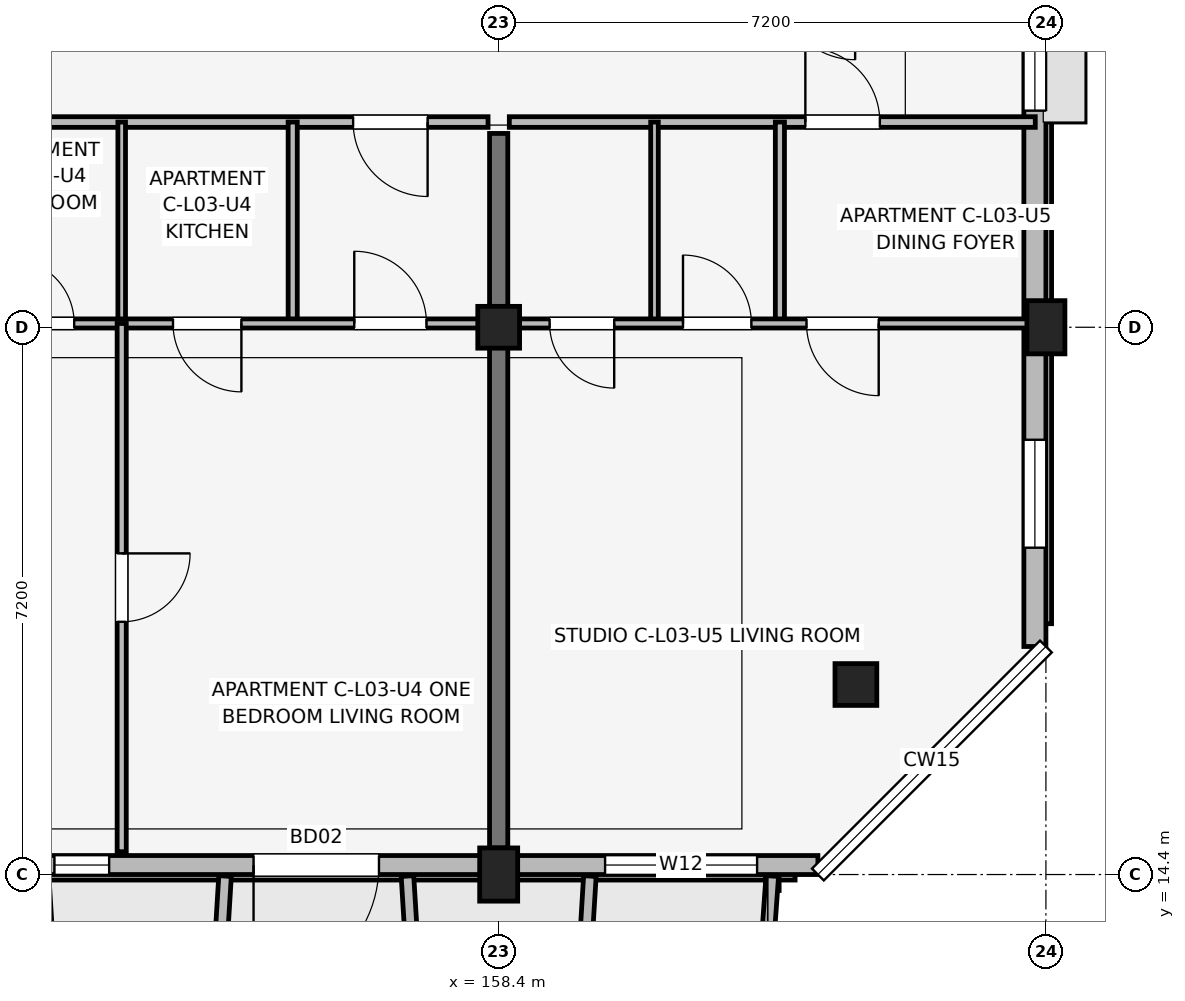
"""IFC4 building model, lengths in metres.
Left out: names, types, materials, properties, quantities, classifications, styles, units other than length and angle.
Written with IfcOpenShell. Run it as: python <this file> out.ifc"""

import sys

from ifc_helpers import new_model, si_unit, direction, frame, frame_2d, origin, origin_2d, place, context, subcontext, project, spatial, rectangle, extrude, element, fill, save


model = new_model("IFC4")
c1 = context("Model", 3, precision=1e-05, world=origin(), true_north=direction((0.0, 1.0)))
c2 = subcontext(c1, "Body", "Model", "MODEL_VIEW")
j1 = project(units=[si_unit("LENGTHUNIT", "METRE"), si_unit("PLANEANGLEUNIT", "RADIAN")], contexts=[c1])
p1 = place(None, origin())
s1 = spatial("IfcSite", under=j1, at=p1, CompositionType="ELEMENT")
p2 = place(p1, origin())
s2 = spatial("IfcBuilding", under=s1, at=p2, CompositionType="ELEMENT")
p3 = place(p2, frame((0.0, 0.0, 11.85)))
s3 = spatial("IfcBuildingStorey", under=s2, at=p3, CompositionType="ELEMENT", Elevation=11.85)
p4 = place(p3, frame((158.4, 14.4, 0.0), z_axis=(0.0, 0.0, 1.0), x_axis=(1.0, 0.0, 0.0)))
e1 = element("IfcColumn", 1, at=p4, inside=s3, PredefinedType="COLUMN", context=c2, shape_type="SweptSolid", body=[
    extrude(rectangle(XDim=0.5, YDim=0.7, at=origin_2d()), origin(), (0.0, 0.0, 1.0), 3.15),
])
for number, where, z_axis, x_axis in (
    (2, (158.4, 21.6, 0.0), (0.0, 0.0, 1.0), (1.0, 0.0, 0.0)),
    (3, (163.1, 16.9, 0.0), (0.0, 0.0, 1.0), (1.0, 0.0, 0.0)),
):
    element("IfcColumn", number, at=place(p3, frame(where, z_axis=z_axis, x_axis=x_axis)), inside=s3, PredefinedType="COLUMN", context=c2, shape_type="SweptSolid", body=[
        extrude(rectangle(XDim=0.55, YDim=0.55, at=origin_2d()), origin(), (0.0, 0.0, 1.0), 3.15),
    ])
p5 = place(p3, frame((165.6, 21.6, 0.0), z_axis=(0.0, 0.0, 1.0), x_axis=(1.0, 0.0, 0.0)))
e4 = element("IfcColumn", 4, at=p5, inside=s3, PredefinedType="COLUMN", context=c2, shape_type="SweptSolid", body=[
    extrude(rectangle(XDim=0.5, YDim=0.7, at=origin_2d()), origin(), (0.0, 0.0, 1.0), 3.15),
])
p6 = place(p3, frame((158.4, 14.75, 0.0), z_axis=(0.0, 0.0, 1.0), x_axis=(0.0, 1.0, 0.0)))
e5 = element("IfcWall", 5, at=p6, inside=s3, PredefinedType="SHEAR", context=c2, shape_type="SweptSolid", body=[
    extrude(rectangle(XDim=9.4, YDim=0.24, at=frame_2d((4.7, 0.0))), origin(), (0.0, 0.0, 1.0), 3.15),
])
p7 = place(p3, frame((132.6, 14.525, 0.0), z_axis=(0.0, 0.0, 1.0), x_axis=(1.0, 0.0, 0.0)))
e6 = element("IfcWall", 6, at=p7, inside=s3, PredefinedType="SOLIDWALL", context=c2, shape_type="SweptSolid", body=[
    extrude(rectangle(XDim=30.0, YDim=0.25, at=frame_2d((15.0, 0.0))), origin(), (0.0, 0.0, 1.0), 2.43),
])
p8 = place(p7, frame((9.9, 0.0, 0.0), z_axis=(0.0, 0.0, 1.0), x_axis=(-1.0, 0.0, 0.0)))
e7 = element("IfcOpeningElement", 7, at=p8, cuts=e6, PredefinedType="OPENING", context=c2, shape_type="SweptSolid", body=[
    extrude(rectangle(XDim=1.8, YDim=2.15, at=frame_2d((0.9, 1.075))), frame((0.0, 0.135, 0.0), z_axis=(0.0, -1.0, 0.0), x_axis=(1.0, 0.0, 0.0)), (0.0, 0.0, 1.0), 0.27),
])
p9 = place(p7, frame((24.225, 0.0, 0.0), z_axis=(0.0, 0.0, 1.0), x_axis=(-1.0, 0.0, 0.0)))
e8 = element("IfcOpeningElement", 8, at=p9, cuts=e6, PredefinedType="OPENING", context=c2, shape_type="SweptSolid", body=[
    extrude(rectangle(XDim=1.65, YDim=2.15, at=frame_2d((0.825, 1.075))), frame((0.0, 0.135, 0.0), z_axis=(0.0, -1.0, 0.0), x_axis=(1.0, 0.0, 0.0)), (0.0, 0.0, 1.0), 0.27),
])
p10 = place(p7, frame((1.215, 0.0, 0.75)))
e9 = element("IfcOpeningElement", 9, at=p10, cuts=e6, PredefinedType="OPENING", context=c2, shape_type="SweptSolid", body=[
    extrude(rectangle(XDim=1.34, YDim=1.55, at=frame_2d((0.67, 0.775))), frame((0.0, 0.135, 0.0), z_axis=(0.0, -1.0, 0.0), x_axis=(1.0, 0.0, 0.0)), (0.0, 0.0, 1.0), 0.27),
])
p11 = place(p7, frame((5.555, 0.0, 0.75)))
e10 = element("IfcOpeningElement", 10, at=p11, cuts=e6, PredefinedType="OPENING", context=c2, shape_type="SweptSolid", body=[
    extrude(rectangle(XDim=0.72, YDim=1.35, at=frame_2d((0.36, 0.675))), frame((0.0, 0.135, 0.0), z_axis=(0.0, -1.0, 0.0), x_axis=(1.0, 0.0, 0.0)), (0.0, 0.0, 1.0), 0.27),
])
p12 = place(p7, frame((12.94, 0.0, 0.7)))
e11 = element("IfcOpeningElement", 11, at=p12, cuts=e6, PredefinedType="OPENING", context=c2, shape_type="SweptSolid", body=[
    extrude(rectangle(XDim=1.72, YDim=1.6, at=frame_2d((0.86, 0.8))), frame((0.0, 0.135, 0.0), z_axis=(0.0, -1.0, 0.0), x_axis=(1.0, 0.0, 0.0)), (0.0, 0.0, 1.0), 0.27),
])
p13 = place(p7, frame((19.955, 0.0, 0.75)))
e12 = element("IfcOpeningElement", 12, at=p13, cuts=e6, PredefinedType="OPENING", context=c2, shape_type="SweptSolid", body=[
    extrude(rectangle(XDim=0.72, YDim=1.35, at=frame_2d((0.36, 0.675))), frame((0.0, 0.135, 0.0), z_axis=(0.0, -1.0, 0.0), x_axis=(1.0, 0.0, 0.0)), (0.0, 0.0, 1.0), 0.27),
])
p14 = place(p7, frame((27.2, 0.0, 0.67)))
e13 = element("IfcOpeningElement", 13, at=p14, cuts=e6, PredefinedType="OPENING", context=c2, shape_type="SweptSolid", body=[
    extrude(rectangle(XDim=2.0, YDim=1.65, at=frame_2d((1.0, 0.825))), frame((0.0, 0.135, 0.0), z_axis=(0.0, -1.0, 0.0), x_axis=(1.0, 0.0, 0.0)), (0.0, 0.0, 1.0), 0.27),
])
p15 = place(p3, frame((165.455, 17.4, 0.0), z_axis=(0.0, 0.0, 1.0), x_axis=(0.0, 1.0, 0.0)))
e14 = element("IfcWall", 14, at=p15, inside=s3, PredefinedType="SOLIDWALL", context=c2, shape_type="SweptSolid", body=[
    extrude(rectangle(XDim=15.6, YDim=0.29, at=frame_2d((7.8, 0.0))), origin(), (0.0, 0.0, 1.0), 2.38),
])
p16 = place(p15, frame((7.05, 0.0, 1.05)))
e15 = element("IfcOpeningElement", 15, at=p16, cuts=e14, PredefinedType="OPENING", context=c2, shape_type="SweptSolid", body=[
    extrude(rectangle(XDim=1.5, YDim=1.15, at=frame_2d((0.75, 0.575))), frame((0.0, 0.155, 0.0), z_axis=(0.0, -1.0, 0.0), x_axis=(1.0, 0.0, 0.0)), (0.0, 0.0, 1.0), 0.31),
])
p17 = place(p15, frame((1.3, 0.0, 0.67)))
e16 = element("IfcOpeningElement", 16, at=p17, cuts=e14, PredefinedType="OPENING", context=c2, shape_type="SweptSolid", body=[
    extrude(rectangle(XDim=1.42, YDim=1.6, at=frame_2d((0.71, 0.8))), frame((0.0, 0.155, 0.0), z_axis=(0.0, -1.0, 0.0), x_axis=(1.0, 0.0, 0.0)), (0.0, 0.0, 1.0), 0.31),
])
for number, where, z_axis, x_axis in (
    (17, (152.4, 14.38, 0.0), (0.0, 0.0, 1.0), (0.061, -0.998, 0.0)),
    (18, (154.8, 14.38, 0.0), (0.0, 0.0, 1.0), (-0.061, -0.998, 0.0)),
    (19, (157.2, 14.38, 0.0), (0.0, 0.0, 1.0), (0.061, -0.998, 0.0)),
):
    element("IfcWall", number, at=place(p3, frame(where, z_axis=z_axis, x_axis=x_axis)), inside=s3, PredefinedType="ELEMENTEDWALL", context=c2, shape_type="SweptSolid", body=[
        extrude(rectangle(XDim=1.964, YDim=0.165, at=frame_2d((0.982, 0.0))), origin(), (0.0, 0.0, 1.0), 2.58),
    ])
p18 = place(p3, frame((159.6, 14.38, 0.0), z_axis=(0.0, 0.0, 1.0), x_axis=(-0.061170732449, -0.998127317276, 0.0)))
e20 = element("IfcWall", 20, at=p18, inside=s3, PredefinedType="ELEMENTEDWALL", context=c2, shape_type="SweptSolid", body=[
    extrude(rectangle(XDim=1.964, YDim=0.165, at=frame_2d((0.982, 0.0))), origin(), (0.0, 0.0, 1.0), 2.95),
])
p19 = place(p3, frame((162.0, 14.38, 0.0), z_axis=(0.0, 0.0, 1.0), x_axis=(-0.071194071069, -0.997462482625, 0.0)))
e21 = element("IfcWall", 21, at=p19, inside=s3, PredefinedType="ELEMENTEDWALL", context=c2, shape_type="SweptSolid", body=[
    extrude(rectangle(XDim=1.965, YDim=0.165, at=frame_2d((0.982, 0.0))), origin(), (0.0, 0.0, 1.0), 2.95),
])
p20 = place(p3, frame((151.34, 24.3, 0.0), z_axis=(0.0, 0.0, 1.0), x_axis=(1.0, 0.0, 0.0)))
e22 = element("IfcWall", 22, at=p20, inside=s3, PredefinedType="PARTITIONING", context=c2, shape_type="SweptSolid", body=[
    extrude(rectangle(XDim=6.92, YDim=0.14, at=frame_2d((3.46, 0.0))), origin(), (0.0, 0.0, 1.0), 2.38),
])
p21 = place(p20, frame((6.125, 0.0, 0.0), z_axis=(0.0, 0.0, 1.0), x_axis=(-1.0, 0.0, 0.0)))
e23 = element("IfcOpeningElement", 23, at=p21, cuts=e22, PredefinedType="OPENING", context=c2, shape_type="SweptSolid", body=[
    extrude(rectangle(XDim=0.98, YDim=2.1, at=frame_2d((0.49, 1.05))), frame((0.0, 0.08, 0.0), z_axis=(0.0, -1.0, 0.0), x_axis=(1.0, 0.0, 0.0)), (0.0, 0.0, 1.0), 0.16),
])
p22 = place(p3, frame((153.44, 21.65, 0.0), z_axis=(0.0, 0.0, 1.0), x_axis=(0.0, 1.0, 0.0)))
e24 = element("IfcWall", 24, at=p22, inside=s3, PredefinedType="PARTITIONING", context=c2, shape_type="SweptSolid", body=[
    extrude(rectangle(XDim=2.65, YDim=0.1, at=frame_2d((1.325, 0.0))), origin(), (0.0, 0.0, 1.0), 2.375),
])
p23 = place(p3, frame((155.69, 21.65, 0.0), z_axis=(0.0, 0.0, 1.0), x_axis=(0.0, 1.0, 0.0)))
e25 = element("IfcWall", 25, at=p23, inside=s3, PredefinedType="PARTITIONING", context=c2, shape_type="SweptSolid", body=[
    extrude(rectangle(XDim=2.65, YDim=0.12, at=frame_2d((1.325, 0.0))), origin(), (0.0, 0.0, 1.0), 2.375),
])
p24 = place(p3, frame((151.34, 21.65, 0.0), z_axis=(0.0, 0.0, 1.0), x_axis=(1.0, 0.0, 0.0)))
e26 = element("IfcWall", 26, at=p24, inside=s3, PredefinedType="PARTITIONING", context=c2, shape_type="SweptSolid", body=[
    extrude(rectangle(XDim=6.92, YDim=0.12, at=frame_2d((3.46, 0.0))), origin(), (0.0, 0.0, 1.0), 2.375),
])
p25 = place(p24, frame((0.625, 0.0, 0.0)))
e27 = element("IfcOpeningElement", 27, at=p25, cuts=e26, PredefinedType="OPENING", context=c2, shape_type="SweptSolid", body=[
    extrude(rectangle(XDim=0.85, YDim=2.08, at=frame_2d((0.425, 1.04))), frame((0.0, 0.07, 0.0), z_axis=(0.0, -1.0, 0.0), x_axis=(1.0, 0.0, 0.0)), (0.0, 0.0, 1.0), 0.14),
])
p26 = place(p24, frame((3.675, 0.0, 0.0), z_axis=(0.0, 0.0, 1.0), x_axis=(-1.0, 0.0, 0.0)))
e28 = element("IfcOpeningElement", 28, at=p26, cuts=e26, PredefinedType="OPENING", context=c2, shape_type="SweptSolid", body=[
    extrude(rectangle(XDim=0.9, YDim=2.08, at=frame_2d((0.45, 1.04))), frame((0.0, 0.07, 0.0), z_axis=(0.0, -1.0, 0.0), x_axis=(1.0, 0.0, 0.0)), (0.0, 0.0, 1.0), 0.14),
])
p27 = place(p24, frame((5.16, 0.0, 0.0)))
e29 = element("IfcOpeningElement", 29, at=p27, cuts=e26, PredefinedType="OPENING", context=c2, shape_type="SweptSolid", body=[
    extrude(rectangle(XDim=0.95, YDim=2.08, at=frame_2d((0.475, 1.04))), frame((0.0, 0.07, 0.0), z_axis=(0.0, -1.0, 0.0), x_axis=(1.0, 0.0, 0.0)), (0.0, 0.0, 1.0), 0.14),
])
p28 = place(p3, frame((153.44, 14.7, 0.0), z_axis=(0.0, 0.0, 1.0), x_axis=(0.0, 1.0, 0.0)))
e30 = element("IfcWall", 30, at=p28, inside=s3, PredefinedType="PARTITIONING", context=c2, shape_type="SweptSolid", body=[
    extrude(rectangle(XDim=6.95, YDim=0.12, at=frame_2d((3.475, 0.0))), origin(), (0.0, 0.0, 1.0), 2.375),
])
p29 = place(p28, frame((3.925, 0.0, 0.0), z_axis=(0.0, 0.0, 1.0), x_axis=(-1.0, 0.0, 0.0)))
e31 = element("IfcOpeningElement", 31, at=p29, cuts=e30, PredefinedType="OPENING", context=c2, shape_type="SweptSolid", body=[
    extrude(rectangle(XDim=0.9, YDim=2.08, at=frame_2d((0.45, 1.04))), frame((0.0, 0.07, 0.0), z_axis=(0.0, -1.0, 0.0), x_axis=(1.0, 0.0, 0.0)), (0.0, 0.0, 1.0), 0.14),
])
p30 = place(p3, frame((158.54, 24.3, 0.0), z_axis=(0.0, 0.0, 1.0), x_axis=(1.0, 0.0, 0.0)))
e32 = element("IfcWall", 32, at=p30, inside=s3, PredefinedType="PARTITIONING", context=c2, shape_type="SweptSolid", body=[
    extrude(rectangle(XDim=6.92, YDim=0.14, at=frame_2d((3.46, 0.0))), origin(), (0.0, 0.0, 1.0), 2.38),
])
p31 = place(p30, frame((3.895, 0.0, 0.0)))
e33 = element("IfcOpeningElement", 33, at=p31, cuts=e32, PredefinedType="OPENING", context=c2, shape_type="SweptSolid", body=[
    extrude(rectangle(XDim=0.98, YDim=2.1, at=frame_2d((0.49, 1.05))), frame((0.0, 0.08, 0.0), z_axis=(0.0, -1.0, 0.0), x_axis=(1.0, 0.0, 0.0)), (0.0, 0.0, 1.0), 0.16),
])
p32 = place(p3, frame((160.45, 21.65, 0.0), z_axis=(0.0, 0.0, 1.0), x_axis=(0.0, 1.0, 0.0)))
e34 = element("IfcWall", 34, at=p32, inside=s3, PredefinedType="PARTITIONING", context=c2, shape_type="SweptSolid", body=[
    extrude(rectangle(XDim=2.65, YDim=0.1, at=frame_2d((1.325, 0.0))), origin(), (0.0, 0.0, 1.0), 2.375),
])
p33 = place(p3, frame((162.1, 21.65, 0.0), z_axis=(0.0, 0.0, 1.0), x_axis=(0.0, 1.0, 0.0)))
e35 = element("IfcWall", 35, at=p33, inside=s3, PredefinedType="PARTITIONING", context=c2, shape_type="SweptSolid", body=[
    extrude(rectangle(XDim=2.65, YDim=0.12, at=frame_2d((1.325, 0.0))), origin(), (0.0, 0.0, 1.0), 2.375),
])
p34 = place(p3, frame((158.54, 21.65, 0.0), z_axis=(0.0, 0.0, 1.0), x_axis=(1.0, 0.0, 0.0)))
e36 = element("IfcWall", 36, at=p34, inside=s3, PredefinedType="PARTITIONING", context=c2, shape_type="SweptSolid", body=[
    extrude(rectangle(XDim=6.92, YDim=0.12, at=frame_2d((3.46, 0.0))), origin(), (0.0, 0.0, 1.0), 2.375),
])
p35 = place(p34, frame((1.38, 0.0, 0.0), z_axis=(0.0, 0.0, 1.0), x_axis=(-1.0, 0.0, 0.0)))
e37 = element("IfcOpeningElement", 37, at=p35, cuts=e36, PredefinedType="OPENING", context=c2, shape_type="SweptSolid", body=[
    extrude(rectangle(XDim=0.85, YDim=2.08, at=frame_2d((0.425, 1.04))), frame((0.0, 0.07, 0.0), z_axis=(0.0, -1.0, 0.0), x_axis=(1.0, 0.0, 0.0)), (0.0, 0.0, 1.0), 0.14),
])
p36 = place(p34, frame((2.285, 0.0, 0.0)))
e38 = element("IfcOpeningElement", 38, at=p36, cuts=e36, PredefinedType="OPENING", context=c2, shape_type="SweptSolid", body=[
    extrude(rectangle(XDim=0.9, YDim=2.08, at=frame_2d((0.45, 1.04))), frame((0.0, 0.07, 0.0), z_axis=(0.0, -1.0, 0.0), x_axis=(1.0, 0.0, 0.0)), (0.0, 0.0, 1.0), 0.14),
])
p37 = place(p34, frame((4.86, 0.0, 0.0), z_axis=(0.0, 0.0, 1.0), x_axis=(-1.0, 0.0, 0.0)))
e39 = element("IfcOpeningElement", 39, at=p37, cuts=e36, PredefinedType="OPENING", context=c2, shape_type="SweptSolid", body=[
    extrude(rectangle(XDim=0.95, YDim=2.08, at=frame_2d((0.475, 1.04))), frame((0.0, 0.07, 0.0), z_axis=(0.0, -1.0, 0.0), x_axis=(1.0, 0.0, 0.0)), (0.0, 0.0, 1.0), 0.14),
])
p38 = place(p9, origin())
e40 = element("IfcDoor", 40, at=p38, inside=s3, OperationType="SINGLE_SWING_LEFT", PredefinedType="DOOR", context=c2, shape_type="SweptSolid", body=[
    extrude(rectangle(XDim=1.65, YDim=2.15, at=frame_2d((0.825, 1.075))), frame((0.0, 0.025, 0.0), z_axis=(0.0, -1.0, 0.0), x_axis=(1.0, 0.0, 0.0)), (0.0, 0.0, 1.0), 0.05),
])
fill(e8, e40)
p39 = place(p13, origin())
e41 = element("IfcWindow", 41, at=p39, inside=s3, PartitioningType="SINGLE_PANEL", PredefinedType="WINDOW", context=c2, shape_type="SweptSolid", body=[
    extrude(rectangle(XDim=0.72, YDim=1.35, at=frame_2d((0.36, 0.675))), frame((0.0, 0.03, 0.0), z_axis=(0.0, -1.0, 0.0), x_axis=(1.0, 0.0, 0.0)), (0.0, 0.0, 1.0), 0.06),
])
fill(e12, e41)
p40 = place(p14, origin())
e42 = element("IfcWindow", 42, at=p40, inside=s3, PartitioningType="SINGLE_PANEL", PredefinedType="WINDOW", context=c2, shape_type="SweptSolid", body=[
    extrude(rectangle(XDim=2.0, YDim=1.65, at=frame_2d((1.0, 0.825))), frame((0.0, 0.03, 0.0), z_axis=(0.0, -1.0, 0.0), x_axis=(1.0, 0.0, 0.0)), (0.0, 0.0, 1.0), 0.06),
])
fill(e13, e42)
p41 = place(p16, origin())
e43 = element("IfcWindow", 43, at=p41, inside=s3, PartitioningType="SINGLE_PANEL", PredefinedType="WINDOW", context=c2, shape_type="SweptSolid", body=[
    extrude(rectangle(XDim=1.5, YDim=1.15, at=frame_2d((0.75, 0.575))), frame((0.0, 0.03, 0.0), z_axis=(0.0, -1.0, 0.0), x_axis=(1.0, 0.0, 0.0)), (0.0, 0.0, 1.0), 0.06),
])
fill(e15, e43)
p42 = place(p17, origin())
e44 = element("IfcWindow", 44, at=p42, inside=s3, PartitioningType="SINGLE_PANEL", PredefinedType="WINDOW", context=c2, shape_type="SweptSolid", body=[
    extrude(rectangle(XDim=1.42, YDim=1.6, at=frame_2d((0.71, 0.8))), frame((0.0, 0.03, 0.0), z_axis=(0.0, -1.0, 0.0), x_axis=(1.0, 0.0, 0.0)), (0.0, 0.0, 1.0), 0.06),
])
fill(e16, e44)
p43 = place(p21, origin())
e45 = element("IfcDoor", 45, at=p43, inside=s3, OperationType="SINGLE_SWING_RIGHT", PredefinedType="DOOR", context=c2, shape_type="SweptSolid", body=[
    extrude(rectangle(XDim=0.98, YDim=2.1, at=frame_2d((0.49, 1.05))), frame((0.0, 0.025, 0.0), z_axis=(0.0, -1.0, 0.0), x_axis=(1.0, 0.0, 0.0)), (0.0, 0.0, 1.0), 0.05),
])
fill(e23, e45)
p44 = place(p25, origin())
e46 = element("IfcDoor", 46, at=p44, inside=s3, OperationType="SINGLE_SWING_LEFT", PredefinedType="DOOR", context=c2, shape_type="SweptSolid", body=[
    extrude(rectangle(XDim=0.85, YDim=2.08, at=frame_2d((0.425, 1.04))), frame((0.0, 0.025, 0.0), z_axis=(0.0, -1.0, 0.0), x_axis=(1.0, 0.0, 0.0)), (0.0, 0.0, 1.0), 0.05),
])
fill(e27, e46)
p45 = place(p26, origin())
e47 = element("IfcDoor", 47, at=p45, inside=s3, OperationType="SINGLE_SWING_RIGHT", PredefinedType="DOOR", context=c2, shape_type="SweptSolid", body=[
    extrude(rectangle(XDim=0.9, YDim=2.08, at=frame_2d((0.45, 1.04))), frame((0.0, 0.025, 0.0), z_axis=(0.0, -1.0, 0.0), x_axis=(1.0, 0.0, 0.0)), (0.0, 0.0, 1.0), 0.05),
])
fill(e28, e47)
p46 = place(p27, origin())
e48 = element("IfcDoor", 48, at=p46, inside=s3, OperationType="SINGLE_SWING_LEFT", PredefinedType="DOOR", context=c2, shape_type="SweptSolid", body=[
    extrude(rectangle(XDim=0.95, YDim=2.08, at=frame_2d((0.475, 1.04))), frame((0.0, 0.025, 0.0), z_axis=(0.0, -1.0, 0.0), x_axis=(1.0, 0.0, 0.0)), (0.0, 0.0, 1.0), 0.05),
])
fill(e29, e48)
p47 = place(p29, origin())
e49 = element("IfcDoor", 49, at=p47, inside=s3, OperationType="SINGLE_SWING_RIGHT", PredefinedType="DOOR", context=c2, shape_type="SweptSolid", body=[
    extrude(rectangle(XDim=0.9, YDim=2.08, at=frame_2d((0.45, 1.04))), frame((0.0, 0.025, 0.0), z_axis=(0.0, -1.0, 0.0), x_axis=(1.0, 0.0, 0.0)), (0.0, 0.0, 1.0), 0.05),
])
fill(e31, e49)
p48 = place(p31, origin())
e50 = element("IfcDoor", 50, at=p48, inside=s3, OperationType="SINGLE_SWING_LEFT", PredefinedType="DOOR", context=c2, shape_type="SweptSolid", body=[
    extrude(rectangle(XDim=0.98, YDim=2.1, at=frame_2d((0.49, 1.05))), frame((0.0, 0.025, 0.0), z_axis=(0.0, -1.0, 0.0), x_axis=(1.0, 0.0, 0.0)), (0.0, 0.0, 1.0), 0.05),
])
fill(e33, e50)
p49 = place(p35, origin())
e51 = element("IfcDoor", 51, at=p49, inside=s3, OperationType="SINGLE_SWING_RIGHT", PredefinedType="DOOR", context=c2, shape_type="SweptSolid", body=[
    extrude(rectangle(XDim=0.85, YDim=2.08, at=frame_2d((0.425, 1.04))), frame((0.0, 0.025, 0.0), z_axis=(0.0, -1.0, 0.0), x_axis=(1.0, 0.0, 0.0)), (0.0, 0.0, 1.0), 0.05),
])
fill(e37, e51)
p50 = place(p36, origin())
e52 = element("IfcDoor", 52, at=p50, inside=s3, OperationType="SINGLE_SWING_LEFT", PredefinedType="DOOR", context=c2, shape_type="SweptSolid", body=[
    extrude(rectangle(XDim=0.9, YDim=2.08, at=frame_2d((0.45, 1.04))), frame((0.0, 0.025, 0.0), z_axis=(0.0, -1.0, 0.0), x_axis=(1.0, 0.0, 0.0)), (0.0, 0.0, 1.0), 0.05),
])
fill(e38, e52)
p51 = place(p37, origin())
e53 = element("IfcDoor", 53, at=p51, inside=s3, OperationType="SINGLE_SWING_RIGHT", PredefinedType="DOOR", context=c2, shape_type="SweptSolid", body=[
    extrude(rectangle(XDim=0.95, YDim=2.08, at=frame_2d((0.475, 1.04))), frame((0.0, 0.025, 0.0), z_axis=(0.0, -1.0, 0.0), x_axis=(1.0, 0.0, 0.0)), (0.0, 0.0, 1.0), 0.05),
])
fill(e39, e53)
save(model, sys.argv[1])
